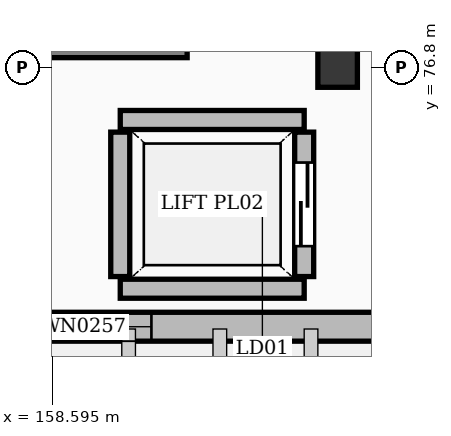
"""IFC4 building model, lengths in metres.
Left out: names, types, materials, properties, quantities, classifications, styles, units other than length and angle.
Written with IfcOpenShell. Run it as: python <this file> out.ifc"""

import sys

from ifc_helpers import new_model, si_unit, direction, frame, frame_2d, origin, origin_2d, place, context, subcontext, project, spatial, rectangle, extrude, element, fill, save


model = new_model("IFC4")
c1 = context("Model", 3, precision=1e-05, world=origin(), true_north=direction((0.0, 1.0)))
c2 = subcontext(c1, "Body", "Model", "MODEL_VIEW")
j1 = project(units=[si_unit("LENGTHUNIT", "METRE"), si_unit("PLANEANGLEUNIT", "RADIAN")], contexts=[c1])
p1 = place(None, origin())
s1 = spatial("IfcSite", under=j1, at=p1, CompositionType="ELEMENT")
p2 = place(p1, origin())
s2 = spatial("IfcBuilding", under=s1, at=p2, CompositionType="ELEMENT")
p3 = place(p2, frame((0.0, 0.0, 50.4)))
s3 = spatial("IfcBuildingStorey", under=s2, at=p3, CompositionType="ELEMENT", Elevation=50.4)
p4 = place(p3, frame((162.35, 76.8, 0.0), z_axis=(0.0, 0.0, 1.0), x_axis=(1.0, 0.0, 0.0)))
e1 = element("IfcColumn", 1, at=p4, inside=s3, PredefinedType="COLUMN", context=c2, shape_type="SweptSolid", body=[
    extrude(rectangle(XDim=0.52, YDim=0.52, at=origin_2d()), origin(), (0.0, 0.0, 1.0), 4.2),
])
p5 = place(p3, frame((175.5, 73.39, 0.0), z_axis=(0.0, 0.0, 1.0), x_axis=(-1.0, 0.0, 0.0)))
e2 = element("IfcWall", 2, at=p5, inside=s3, PredefinedType="SOLIDWALL", context=c2, shape_type="SweptSolid", body=[
    extrude(rectangle(XDim=22.2, YDim=0.38, at=frame_2d((11.1, 0.0))), origin(), (0.0, 0.0, 1.0), 3.96),
])
p6 = place(p5, frame((10.2, 0.0, 0.0)))
e3 = element("IfcOpeningElement", 3, at=p6, cuts=e2, PredefinedType="OPENING", context=c2, shape_type="SweptSolid", body=[
    extrude(rectangle(XDim=1.1, YDim=2.2, at=frame_2d((0.55, 1.1))), frame((0.0, 0.202, 0.0), z_axis=(0.0, -1.0, 0.0), x_axis=(1.0, 0.0, 0.0)), (0.0, 0.0, 1.0), 0.404),
])
p7 = place(p5, frame((3.2, 0.0, 0.55)))
e4 = element("IfcOpeningElement", 4, at=p7, cuts=e2, PredefinedType="OPENING", context=c2, shape_type="SweptSolid", body=[
    extrude(rectangle(XDim=1.8, YDim=1.76, at=frame_2d((0.9, 0.88))), frame((0.0, 0.202, 0.0), z_axis=(0.0, -1.0, 0.0), x_axis=(1.0, 0.0, 0.0)), (0.0, 0.0, 1.0), 0.404),
])
p8 = place(p5, frame((15.6, 0.0, 0.55)))
e5 = element("IfcOpeningElement", 5, at=p8, cuts=e2, PredefinedType="OPENING", context=c2, shape_type="SweptSolid", body=[
    extrude(rectangle(XDim=1.8, YDim=1.76, at=frame_2d((0.9, 0.88))), frame((0.0, 0.202, 0.0), z_axis=(0.0, -1.0, 0.0), x_axis=(1.0, 0.0, 0.0)), (0.0, 0.0, 1.0), 0.404),
])
p9 = place(p3, frame((156.7, 77.18, 0.0), z_axis=(0.0, 0.0, 1.0), x_axis=(1.0, 0.0, 0.0)))
e6 = element("IfcWall", 6, at=p9, inside=s3, PredefinedType="SHEAR", context=c2, shape_type="SweptSolid", body=[
    extrude(rectangle(XDim=3.67, YDim=0.5, at=frame_2d((1.835, 0.0))), origin(), (0.0, 0.0, 1.0), 3.96),
])
for number, where, z_axis, x_axis in (
    (7, (159.49, 73.89, 0.0), (0.0, 0.0, 1.0), (1.0, 0.0, 0.0)),
    (8, (159.49, 76.11, 0.0), (0.0, 0.0, 1.0), (1.0, 0.0, 0.0)),
):
    element("IfcWall", number, at=place(p3, frame(where, z_axis=z_axis, x_axis=x_axis)), inside=s3, PredefinedType="SOLIDWALL", context=c2, shape_type="SweptSolid", body=[
        extrude(rectangle(XDim=2.42, YDim=0.25, at=frame_2d((1.21, 0.0))), origin(), (0.0, 0.0, 1.0), 3.96),
    ])
p10 = place(p3, frame((159.49, 74.05, 0.0), z_axis=(0.0, 0.0, 1.0), x_axis=(0.0, 1.0, 0.0)))
e9 = element("IfcWall", 9, at=p10, inside=s3, PredefinedType="SOLIDWALL", context=c2, shape_type="SweptSolid", body=[
    extrude(rectangle(XDim=1.9, YDim=0.25, at=frame_2d((0.95, 0.0))), origin(), (0.0, 0.0, 1.0), 3.96),
])
p11 = place(p3, frame((161.91, 74.05, 0.0), z_axis=(0.0, 0.0, 1.0), x_axis=(0.0, 1.0, 0.0)))
e10 = element("IfcWall", 10, at=p11, inside=s3, PredefinedType="SOLIDWALL", context=c2, shape_type="SweptSolid", body=[
    extrude(rectangle(XDim=1.9, YDim=0.25, at=frame_2d((0.95, 0.0))), origin(), (0.0, 0.0, 1.0), 3.96),
])
p12 = place(p11, frame((0.4, 0.0, 0.0)))
e11 = element("IfcOpeningElement", 11, at=p12, cuts=e10, PredefinedType="OPENING", context=c2, shape_type="SweptSolid", body=[
    extrude(rectangle(XDim=1.1, YDim=2.2, at=frame_2d((0.55, 1.1))), frame((0.0, 0.137, 0.0), z_axis=(0.0, -1.0, 0.0), x_axis=(1.0, 0.0, 0.0)), (0.0, 0.0, 1.0), 0.274),
])
p13 = place(p8, origin())
e12 = element("IfcWindow", 12, at=p13, inside=s3, PartitioningType="SINGLE_PANEL", PredefinedType="WINDOW", context=c2, shape_type="SweptSolid", body=[
    extrude(rectangle(XDim=1.8, YDim=1.76, at=frame_2d((0.9, 0.88))), frame((0.0, 0.03, 0.0), z_axis=(0.0, -1.0, 0.0), x_axis=(1.0, 0.0, 0.0)), (0.0, 0.0, 1.0), 0.06),
])
fill(e5, e12)
p14 = place(p12, origin())
e13 = element("IfcDoor", 13, at=p14, inside=s3, OperationType="SLIDING_TO_LEFT", PredefinedType="DOOR", context=c2, shape_type="SweptSolid", body=[
    extrude(rectangle(XDim=1.1, YDim=2.2, at=frame_2d((0.55, 1.1))), frame((0.0, 0.025, 0.0), z_axis=(0.0, -1.0, 0.0), x_axis=(1.0, 0.0, 0.0)), (0.0, 0.0, 1.0), 0.05),
])
fill(e11, e13)
save(model, sys.argv[1])
